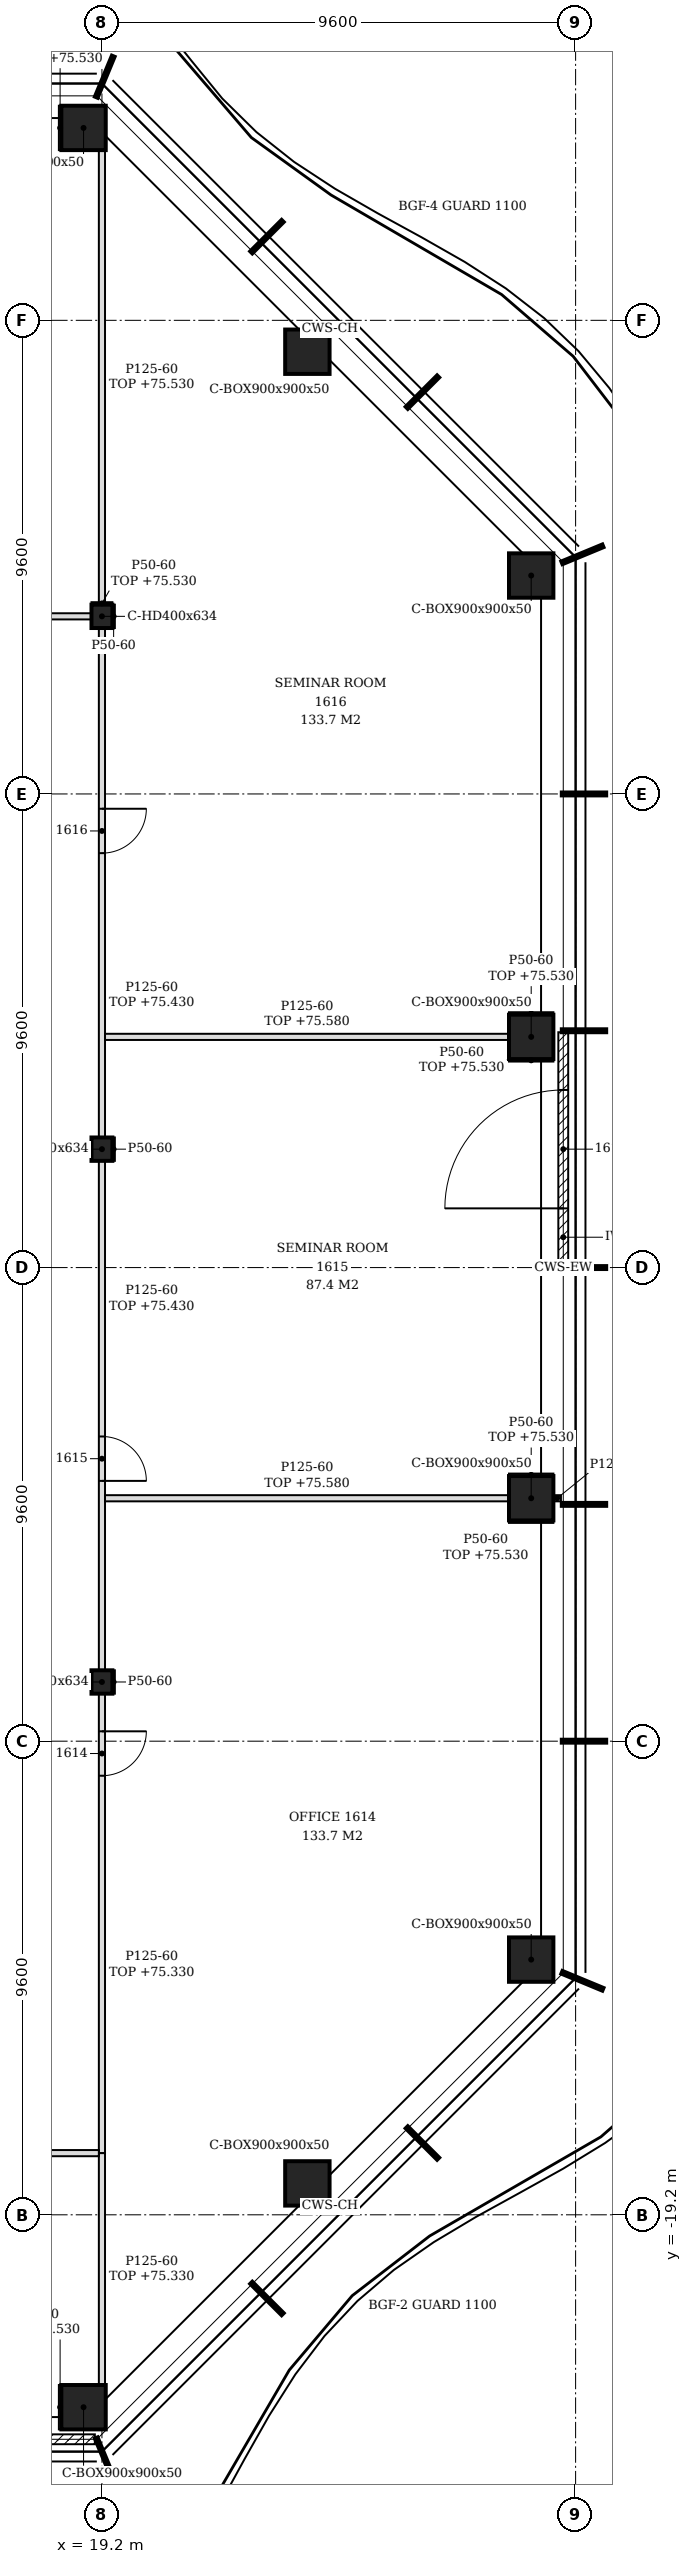
"""IFC4 building model, lengths in metres.
Left out: names, types, materials, properties, quantities, classifications, styles, units other than length and angle.
Written with IfcOpenShell. Run it as: python <this file> out.ifc"""

import sys

from ifc_helpers import new_model, si_unit, direction, frame, frame_2d, origin, origin_2d, place, context, subcontext, project, spatial, polyline, rectangle, hollow_rectangle, i_section, outline, extrude, element, fill, save


model = new_model("IFC4")
c1 = context("Model", 3, precision=1e-05, world=origin(), true_north=direction((0.0, 1.0)))
c2 = subcontext(c1, "Body", "Model", "MODEL_VIEW")
j1 = project(units=[si_unit("LENGTHUNIT", "METRE"), si_unit("PLANEANGLEUNIT", "RADIAN")], contexts=[c1])
p1 = place(None, origin())
s1 = spatial("IfcSite", under=j1, at=p1, CompositionType="ELEMENT")
p2 = place(p1, origin())
s2 = spatial("IfcBuilding", under=s1, at=p2, CompositionType="ELEMENT")
p3 = place(p2, frame((0.0, 0.0, 72.6)))
s3 = spatial("IfcBuildingStorey", under=s2, at=p3, CompositionType="ELEMENT", Elevation=72.6)
for number, where, z_axis, x_axis in (
    (1, (18.827, -23.1, -0.15), (0.0, 0.0, 1.0), (1.0, 0.0, 0.0)),
    (2, (23.364, -18.564, -0.15), (0.0, 0.0, 1.0), (1.0, 0.0, 0.0)),
    (3, (27.9, -14.027, -0.15), (0.0, 0.0, 1.0), (1.0, 0.0, 0.0)),
    (4, (27.9, -4.676, -0.15), (0.0, 0.0, 1.0), (1.0, 0.0, 0.0)),
    (5, (27.9, 4.676, -0.15), (0.0, 0.0, 1.0), (1.0, 0.0, 0.0)),
    (6, (27.9, 14.027, -0.15), (0.0, 0.0, 1.0), (1.0, 0.0, 0.0)),
    (7, (23.364, 18.564, -0.15), (0.0, 0.0, 1.0), (1.0, 0.0, 0.0)),
    (8, (18.827, 23.1, -0.15), (0.0, 0.0, 1.0), (1.0, 0.0, 0.0)),
):
    element("IfcColumn", number, at=place(p3, frame(where, z_axis=z_axis, x_axis=x_axis)), inside=s3, PredefinedType="COLUMN", context=c2, shape_type="SweptSolid", body=[
        extrude(hollow_rectangle(XDim=0.9, YDim=0.9, WallThickness=0.05, at=origin_2d()), origin(), (0.0, 0.0, 1.0), 3.6),
    ])
for number, where, z_axis, x_axis in (
    (9, (19.2, -8.4, -0.15), (0.0, 0.0, 1.0), (1.0, 0.0, 0.0)),
    (10, (19.2, 2.4, -0.15), (0.0, 0.0, 1.0), (1.0, 0.0, 0.0)),
    (11, (19.2, 13.2, -0.15), (0.0, 0.0, 1.0), (1.0, 0.0, 0.0)),
):
    element("IfcColumn", number, at=place(p3, frame(where, z_axis=z_axis, x_axis=x_axis)), inside=s3, PredefinedType="COLUMN", context=c2, shape_type="SweptSolid", body=[
        extrude(i_section(OverallWidth=0.424, OverallDepth=0.474, WebThickness=0.048, FlangeThickness=0.077, FilletRadius=0.015, at=origin_2d()), origin(), (0.0, 0.0, 1.0), 3.6),
    ])
p4 = place(p3, frame((14.43, -23.75, 0.0), z_axis=(0.0, 0.0, 1.0), x_axis=(1.0, 0.0, 0.0)))
e12 = element("IfcWall", 12, at=p4, inside=s3, PredefinedType="NOTDEFINED", context=c2, shape_type="SweptSolid", body=[
    extrude(rectangle(XDim=4.626, YDim=0.2, at=frame_2d((2.313, 0.0))), origin(), (0.0, 0.0, 1.0), 3.45),
])
p5 = place(p4, frame((1.118, 0.0, 0.0)))
e13 = element("IfcOpeningElement", 13, at=p5, cuts=e12, PredefinedType="OPENING", context=c2, shape_type="SweptSolid", body=[
    extrude(rectangle(XDim=2.4, YDim=2.4, at=frame_2d((1.2, 1.2))), frame((0.0, 0.11, 0.0), z_axis=(0.0, -1.0, 0.0), x_axis=(1.0, 0.0, 0.0)), (0.0, 0.0, 1.0), 0.22),
])
p6 = place(p3, frame((28.55, 0.03, 0.0), z_axis=(0.0, 0.0, 1.0), x_axis=(0.0, 1.0, 0.0)))
e14 = element("IfcWall", 14, at=p6, inside=s3, PredefinedType="NOTDEFINED", context=c2, shape_type="SweptSolid", body=[
    extrude(rectangle(XDim=4.74, YDim=0.2, at=frame_2d((2.37, 0.0))), origin(), (0.0, 0.0, 1.0), 3.45),
])
p7 = place(p6, frame((1.17, 0.0, 0.0)))
e15 = element("IfcOpeningElement", 15, at=p7, cuts=e14, PredefinedType="OPENING", context=c2, shape_type="SweptSolid", body=[
    extrude(rectangle(XDim=2.4, YDim=2.4, at=frame_2d((1.2, 1.2))), frame((0.0, 0.11, 0.0), z_axis=(0.0, -1.0, 0.0), x_axis=(1.0, 0.0, 0.0)), (0.0, 0.0, 1.0), 0.22),
])
p8 = place(p3, frame((19.2, -22.65, 0.0), z_axis=(0.0, 0.0, 1.0), x_axis=(0.0, 1.0, 0.0)))
e16 = element("IfcWall", 16, at=p8, inside=s3, PredefinedType="PARTITIONING", context=c2, shape_type="SweptSolid", body=[
    extrude(outline(polyline([(0.0, 0.0), (4.7, 0.0), (4.7, 2.73), (0.48, 2.73), (0.478, 2.63), (0.0, 2.63), (0.0, 0.0)])), frame((0.0, 0.062, 0.0), z_axis=(0.0, -1.0, 0.0), x_axis=(1.0, 0.0, 0.0)), (0.0, 0.0, 1.0), 0.125),
])
p9 = place(p3, frame((-20.75, -17.95, 0.0), z_axis=(0.0, 0.0, 1.0), x_axis=(1.0, 0.0, 0.0)))
e17 = element("IfcWall", 17, at=p9, inside=s3, PredefinedType="PARTITIONING", context=c2, shape_type="SweptSolid", body=[
    extrude(outline(polyline([(0.0, 0.0), (39.887, 0.0), (39.887, 2.73), (39.8, 2.73), (39.798, 3.45), (28.1, 3.45), (28.098, 2.73), (27.8, 2.73), (27.798, 3.45), (16.1, 3.45), (16.098, 2.73), (15.8, 2.73), (15.798, 3.45), (6.5, 3.45), (6.498, 2.93), (6.2, 2.93), (6.198, 3.45), (0.0, 3.45), (0.0, 0.0)])), frame((0.0, 0.062, 0.0), z_axis=(0.0, -1.0, 0.0), x_axis=(1.0, 0.0, 0.0)), (0.0, 0.0, 1.0), 0.125),
])
p10 = place(p9, frame((5.15, 0.0, 0.0)))
e18 = element("IfcOpeningElement", 18, at=p10, cuts=e17, PredefinedType="OPENING", context=c2, shape_type="SweptSolid", body=[
    extrude(rectangle(XDim=0.9, YDim=2.1, at=frame_2d((0.45, 1.05))), frame((0.0, 0.073, 0.0), z_axis=(0.0, -1.0, 0.0), x_axis=(1.0, 0.0, 0.0)), (0.0, 0.0, 1.0), 0.145),
])
p11 = place(p9, frame((14.75, 0.0, 0.0)))
e19 = element("IfcOpeningElement", 19, at=p11, cuts=e17, PredefinedType="OPENING", context=c2, shape_type="SweptSolid", body=[
    extrude(rectangle(XDim=0.9, YDim=2.1, at=frame_2d((0.45, 1.05))), frame((0.0, 0.073, 0.0), z_axis=(0.0, -1.0, 0.0), x_axis=(1.0, 0.0, 0.0)), (0.0, 0.0, 1.0), 0.145),
])
p12 = place(p9, frame((24.35, 0.0, 0.0)))
e20 = element("IfcOpeningElement", 20, at=p12, cuts=e17, PredefinedType="OPENING", context=c2, shape_type="SweptSolid", body=[
    extrude(rectangle(XDim=0.9, YDim=2.1, at=frame_2d((0.45, 1.05))), frame((0.0, 0.073, 0.0), z_axis=(0.0, -1.0, 0.0), x_axis=(1.0, 0.0, 0.0)), (0.0, 0.0, 1.0), 0.145),
])
p13 = place(p9, frame((29.75, 0.0, 0.0)))
e21 = element("IfcOpeningElement", 21, at=p13, cuts=e17, PredefinedType="OPENING", context=c2, shape_type="SweptSolid", body=[
    extrude(rectangle(XDim=0.9, YDim=2.1, at=frame_2d((0.45, 1.05))), frame((0.0, 0.073, 0.0), z_axis=(0.0, -1.0, 0.0), x_axis=(1.0, 0.0, 0.0)), (0.0, 0.0, 1.0), 0.145),
])
p14 = place(p9, frame((35.45, 0.0, 0.0)))
e22 = element("IfcOpeningElement", 22, at=p14, cuts=e17, PredefinedType="OPENING", context=c2, shape_type="SweptSolid", body=[
    extrude(rectangle(XDim=0.9, YDim=2.1, at=frame_2d((0.45, 1.05))), frame((0.0, 0.073, 0.0), z_axis=(0.0, -1.0, 0.0), x_axis=(1.0, 0.0, 0.0)), (0.0, 0.0, 1.0), 0.145),
])
p15 = place(p3, frame((19.2, -17.95, 0.0), z_axis=(0.0, 0.0, 1.0), x_axis=(0.0, 1.0, 0.0)))
e23 = element("IfcWall", 23, at=p15, inside=s3, PredefinedType="PARTITIONING", context=c2, shape_type="SweptSolid", body=[
    extrude(rectangle(XDim=9.313, YDim=0.125, at=frame_2d((4.656, 0.0))), origin(), (0.0, 0.0, 1.0), 2.73),
])
p16 = place(p15, frame((7.65, 0.0, 0.0)))
e24 = element("IfcOpeningElement", 24, at=p16, cuts=e23, PredefinedType="OPENING", context=c2, shape_type="SweptSolid", body=[
    extrude(rectangle(XDim=0.9, YDim=2.1, at=frame_2d((0.45, 1.05))), frame((0.0, 0.073, 0.0), z_axis=(0.0, -1.0, 0.0), x_axis=(1.0, 0.0, 0.0)), (0.0, 0.0, 1.0), 0.145),
])
p17 = place(p3, frame((19.2, -8.163, 0.0), z_axis=(0.0, 0.0, 1.0), x_axis=(0.0, 1.0, 0.0)))
e25 = element("IfcWall", 25, at=p17, inside=s3, PredefinedType="PARTITIONING", context=c2, shape_type="SweptSolid", body=[
    extrude(rectangle(XDim=10.326, YDim=0.125, at=frame_2d((5.163, 0.0))), origin(), (0.0, 0.0, 1.0), 2.83),
])
p18 = place(p17, frame((3.839, 0.0, 0.0)))
e26 = element("IfcOpeningElement", 26, at=p18, cuts=e25, PredefinedType="OPENING", context=c2, shape_type="SweptSolid", body=[
    extrude(rectangle(XDim=0.9, YDim=2.1, at=frame_2d((0.45, 1.05))), frame((0.0, 0.073, 0.0), z_axis=(0.0, -1.0, 0.0), x_axis=(1.0, 0.0, 0.0)), (0.0, 0.0, 1.0), 0.145),
])
p19 = place(p3, frame((19.262, -4.676, 0.0), z_axis=(0.0, 0.0, 1.0), x_axis=(1.0, 0.0, 0.0)))
e27 = element("IfcWall", 27, at=p19, inside=s3, PredefinedType="PARTITIONING", context=c2, shape_type="SweptSolid", body=[
    extrude(outline(polyline([(0.0, 0.0), (8.188, 0.0), (8.188, 2.98), (0.087, 2.98), (0.085, 2.83), (0.0, 2.83), (0.0, 0.0)])), frame((0.0, 0.062, 0.0), z_axis=(0.0, -1.0, 0.0), x_axis=(1.0, 0.0, 0.0)), (0.0, 0.0, 1.0), 0.125),
])
p20 = place(p3, frame((28.35, -4.676, 0.0), z_axis=(0.0, 0.0, 1.0), x_axis=(1.0, 0.0, 0.0)))
e28 = element("IfcWall", 28, at=p20, inside=s3, PredefinedType="PARTITIONING", context=c2, shape_type="SweptSolid", body=[
    extrude(rectangle(XDim=0.153, YDim=0.125, at=frame_2d((0.076, 0.0))), origin(), (0.0, 0.0, 1.0), 3.45),
])
p21 = place(p3, frame((19.2, 2.637, 0.0), z_axis=(0.0, 0.0, 1.0), x_axis=(0.0, 1.0, 0.0)))
e29 = element("IfcWall", 29, at=p21, inside=s3, PredefinedType="PARTITIONING", context=c2, shape_type="SweptSolid", body=[
    extrude(rectangle(XDim=10.326, YDim=0.125, at=frame_2d((5.163, 0.0))), origin(), (0.0, 0.0, 1.0), 2.83),
])
p22 = place(p21, frame((5.763, 0.0, 0.0)))
e30 = element("IfcOpeningElement", 30, at=p22, cuts=e29, PredefinedType="OPENING", context=c2, shape_type="SweptSolid", body=[
    extrude(rectangle(XDim=0.9, YDim=2.1, at=frame_2d((0.45, 1.05))), frame((0.0, 0.073, 0.0), z_axis=(0.0, -1.0, 0.0), x_axis=(1.0, 0.0, 0.0)), (0.0, 0.0, 1.0), 0.145),
])
p23 = place(p3, frame((19.262, 4.676, 0.0), z_axis=(0.0, 0.0, 1.0), x_axis=(1.0, 0.0, 0.0)))
e31 = element("IfcWall", 31, at=p23, inside=s3, PredefinedType="PARTITIONING", context=c2, shape_type="SweptSolid", body=[
    extrude(outline(polyline([(0.0, 0.0), (8.188, 0.0), (8.188, 2.98), (0.087, 2.98), (0.085, 2.83), (0.0, 2.83), (0.0, 0.0)])), frame((0.0, 0.062, 0.0), z_axis=(0.0, -1.0, 0.0), x_axis=(1.0, 0.0, 0.0)), (0.0, 0.0, 1.0), 0.125),
])
p24 = place(p3, frame((7.412, 13.2, 0.0), z_axis=(0.0, 0.0, 1.0), x_axis=(1.0, 0.0, 0.0)))
e32 = element("IfcWall", 32, at=p24, inside=s3, PredefinedType="PARTITIONING", context=c2, shape_type="SweptSolid", body=[
    extrude(rectangle(XDim=11.576, YDim=0.125, at=frame_2d((5.788, 0.0))), origin(), (0.0, 0.0, 1.0), 2.83),
])
p25 = place(p24, frame((1.588, 0.0, 0.0)))
e33 = element("IfcOpeningElement", 33, at=p25, cuts=e32, PredefinedType="OPENING", context=c2, shape_type="SweptSolid", body=[
    extrude(rectangle(XDim=0.9, YDim=2.1, at=frame_2d((0.45, 1.05))), frame((0.0, 0.073, 0.0), z_axis=(0.0, -1.0, 0.0), x_axis=(1.0, 0.0, 0.0)), (0.0, 0.0, 1.0), 0.145),
])
p26 = place(p3, frame((19.2, 13.437, 0.0), z_axis=(0.0, 0.0, 1.0), x_axis=(0.0, 1.0, 0.0)))
e34 = element("IfcWall", 34, at=p26, inside=s3, PredefinedType="PARTITIONING", context=c2, shape_type="SweptSolid", body=[
    extrude(outline(polyline([(0.0, 0.0), (9.213, 0.0), (9.213, 2.63), (8.733, 2.63), (8.731, 2.93), (0.0, 2.93), (0.0, 0.0)])), frame((0.0, 0.062, 0.0), z_axis=(0.0, -1.0, 0.0), x_axis=(1.0, 0.0, 0.0)), (0.0, 0.0, 1.0), 0.125),
])
p27 = place(p3, frame((18.352, -23.55, 0.0), z_axis=(0.0, 0.0, 1.0), x_axis=(0.0, 1.0, 0.0)))
e35 = element("IfcWall", 35, at=p27, inside=s3, PredefinedType="PARTITIONING", context=c2, shape_type="SweptSolid", body=[
    extrude(rectangle(XDim=0.9, YDim=0.05, at=frame_2d((0.45, 0.0))), origin(), (0.0, 0.0, 1.0), 2.93),
])
for number, where, z_axis, x_axis in (
    (36, (19.437, -8.637, 0.0), (0.0, 0.0, 1.0), (0.0, 1.0, 0.0)),
    (37, (19.437, 2.163, 0.0), (0.0, 0.0, 1.0), (0.0, 1.0, 0.0)),
):
    element("IfcWall", number, at=place(p3, frame(where, z_axis=z_axis, x_axis=x_axis)), inside=s3, PredefinedType="PARTITIONING", context=c2, shape_type="SweptSolid", body=[
        extrude(rectangle(XDim=0.474, YDim=0.05, at=frame_2d((0.237, 0.0))), origin(), (0.0, 0.0, 1.0), 3.45),
    ])
p28 = place(p3, frame((19.437, 12.963, 0.0), z_axis=(0.0, 0.0, 1.0), x_axis=(0.0, 1.0, 0.0)))
e38 = element("IfcWall", 38, at=p28, inside=s3, PredefinedType="PARTITIONING", context=c2, shape_type="SweptSolid", body=[
    extrude(rectangle(XDim=0.474, YDim=0.05, at=frame_2d((0.237, 0.0))), origin(), (0.0, 0.0, 1.0), 3.45),
])
for number, where, z_axis, x_axis in (
    (39, (27.45, -4.201, 0.0), (0.0, 0.0, 1.0), (1.0, 0.0, 0.0)),
    (40, (27.45, -5.151, 0.0), (0.0, 0.0, 1.0), (1.0, 0.0, 0.0)),
    (41, (27.45, 5.151, 0.0), (0.0, 0.0, 1.0), (1.0, 0.0, 0.0)),
    (42, (27.45, 4.201, 0.0), (0.0, 0.0, 1.0), (1.0, 0.0, 0.0)),
):
    element("IfcWall", number, at=place(p3, frame(where, z_axis=z_axis, x_axis=x_axis)), inside=s3, PredefinedType="PARTITIONING", context=c2, shape_type="SweptSolid", body=[
        extrude(rectangle(XDim=0.9, YDim=0.05, at=frame_2d((0.45, 0.0))), origin(), (0.0, 0.0, 1.0), 2.93),
    ])
p29 = place(p3, frame((18.988, 13.462, 0.0), z_axis=(0.0, 0.0, 1.0), x_axis=(1.0, 0.0, 0.0)))
e43 = element("IfcWall", 43, at=p29, inside=s3, PredefinedType="PARTITIONING", context=c2, shape_type="SweptSolid", body=[
    extrude(rectangle(XDim=0.424, YDim=0.05, at=frame_2d((0.212, 0.0))), origin(), (0.0, 0.0, 1.0), 2.93),
])
p30 = place(p3, frame((18.352, 22.65, 0.0), z_axis=(0.0, 0.0, 1.0), x_axis=(0.0, 1.0, 0.0)))
e44 = element("IfcWall", 44, at=p30, inside=s3, PredefinedType="PARTITIONING", context=c2, shape_type="SweptSolid", body=[
    extrude(rectangle(XDim=0.9, YDim=0.05, at=frame_2d((0.45, 0.0))), origin(), (0.0, 0.0, 1.0), 2.93),
])
p31 = place(p7, origin())
e45 = element("IfcDoor", 45, at=p31, inside=s3, OperationType="SINGLE_SWING_LEFT", PredefinedType="DOOR", context=c2, shape_type="SweptSolid", body=[
    extrude(rectangle(XDim=2.4, YDim=2.4, at=frame_2d((1.2, 1.2))), frame((0.0, 0.025, 0.0), z_axis=(0.0, -1.0, 0.0), x_axis=(1.0, 0.0, 0.0)), (0.0, 0.0, 1.0), 0.05),
])
fill(e15, e45)
p32 = place(p16, frame((0.9, 0.0, 0.0), z_axis=(0.0, 0.0, 1.0), x_axis=(-1.0, 0.0, 0.0)))
e46 = element("IfcDoor", 46, at=p32, inside=s3, OperationType="SINGLE_SWING_LEFT", PredefinedType="DOOR", context=c2, shape_type="SweptSolid", body=[
    extrude(rectangle(XDim=0.9, YDim=2.1, at=frame_2d((0.45, 1.05))), frame((0.0, 0.025, 0.0), z_axis=(0.0, -1.0, 0.0), x_axis=(1.0, 0.0, 0.0)), (0.0, 0.0, 1.0), 0.05),
])
fill(e24, e46)
p33 = place(p18, frame((0.9, 0.0, 0.0), z_axis=(0.0, 0.0, 1.0), x_axis=(-1.0, 0.0, 0.0)))
e47 = element("IfcDoor", 47, at=p33, inside=s3, OperationType="SINGLE_SWING_RIGHT", PredefinedType="DOOR", context=c2, shape_type="SweptSolid", body=[
    extrude(rectangle(XDim=0.9, YDim=2.1, at=frame_2d((0.45, 1.05))), frame((0.0, 0.025, 0.0), z_axis=(0.0, -1.0, 0.0), x_axis=(1.0, 0.0, 0.0)), (0.0, 0.0, 1.0), 0.05),
])
fill(e26, e47)
p34 = place(p22, frame((0.9, 0.0, 0.0), z_axis=(0.0, 0.0, 1.0), x_axis=(-1.0, 0.0, 0.0)))
e48 = element("IfcDoor", 48, at=p34, inside=s3, OperationType="SINGLE_SWING_LEFT", PredefinedType="DOOR", context=c2, shape_type="SweptSolid", body=[
    extrude(rectangle(XDim=0.9, YDim=2.1, at=frame_2d((0.45, 1.05))), frame((0.0, 0.025, 0.0), z_axis=(0.0, -1.0, 0.0), x_axis=(1.0, 0.0, 0.0)), (0.0, 0.0, 1.0), 0.05),
])
fill(e30, e48)
save(model, sys.argv[1])
